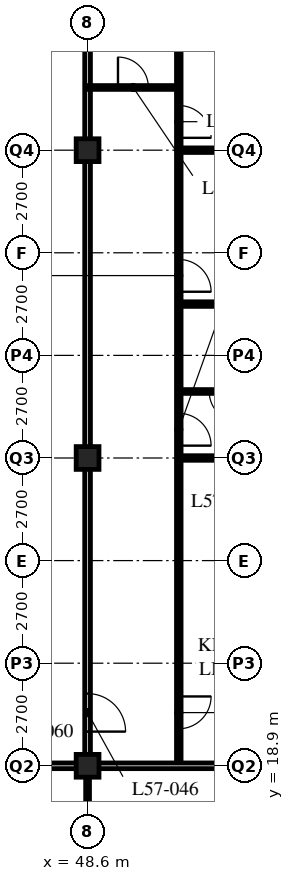
"""IFC4 building model, lengths in metres.
Left out: names, types, materials, properties, quantities, classifications, styles, units other than length and angle.
Written with IfcOpenShell. Run it as: python <this file> out.ifc"""

import sys

from ifc_helpers import new_model, si_unit, direction, frame, frame_2d, origin, origin_2d, place, context, subcontext, project, spatial, rectangle, hollow_rectangle, extrude, element, fill, save


model = new_model("IFC4")
c1 = context("Model", 3, precision=1e-05, world=origin(), true_north=direction((0.0, 1.0)))
c2 = subcontext(c1, "Body", "Model", "MODEL_VIEW")
j1 = project(units=[si_unit("LENGTHUNIT", "METRE"), si_unit("PLANEANGLEUNIT", "RADIAN")], contexts=[c1])
p1 = place(None, origin())
s1 = spatial("IfcSite", under=j1, at=p1, CompositionType="ELEMENT")
p2 = place(p1, origin())
s2 = spatial("IfcBuilding", under=s1, at=p2, CompositionType="ELEMENT")
p3 = place(p2, frame((0.0, 0.0, 220.8)))
s3 = spatial("IfcBuildingStorey", under=s2, at=p3, CompositionType="ELEMENT", Elevation=220.8)
for number, where, z_axis, x_axis in (
    (1, (48.6, 18.9, 0.0), (0.0, 0.0, 1.0), (1.0, 0.0, 0.0)),
    (2, (48.6, 27.0, 0.0), (0.0, 0.0, 1.0), (1.0, 0.0, 0.0)),
    (3, (48.6, 35.1, 0.0), (0.0, 0.0, 1.0), (1.0, 0.0, 0.0)),
):
    element("IfcColumn", number, at=place(p3, frame(where, z_axis=z_axis, x_axis=x_axis)), inside=s3, PredefinedType="COLUMN", context=c2, shape_type="SweptSolid", body=[
        extrude(hollow_rectangle(XDim=0.6, YDim=0.6, WallThickness=0.05, at=origin_2d()), origin(), (0.0, 0.0, 1.0), 3.6),
    ])
p4 = place(p3, frame((12.15, 18.9, 0.0), z_axis=(0.0, 0.0, 1.0), x_axis=(1.0, 0.0, 0.0)))
e4 = element("IfcWall", 4, at=p4, inside=s3, PredefinedType="PARTITIONING", context=c2, shape_type="SweptSolid", body=[
    extrude(rectangle(XDim=36.45, YDim=0.15, at=frame_2d((18.225, 0.0))), origin(), (0.0, 0.0, 1.0), 2.628),
])
p5 = place(p4, frame((4.95, 0.0, 0.0)))
e5 = element("IfcOpeningElement", 5, at=p5, cuts=e4, PredefinedType="OPENING", context=c2, shape_type="SweptSolid", body=[
    extrude(rectangle(XDim=1.0, YDim=2.1, at=frame_2d((0.5, 1.05))), frame((0.0, 0.085, 0.0), z_axis=(0.0, -1.0, 0.0), x_axis=(1.0, 0.0, 0.0)), (0.0, 0.0, 1.0), 0.17),
])
p6 = place(p4, frame((22.6, 0.0, 0.0)))
e6 = element("IfcOpeningElement", 6, at=p6, cuts=e4, PredefinedType="OPENING", context=c2, shape_type="SweptSolid", body=[
    extrude(rectangle(XDim=1.0, YDim=2.1, at=frame_2d((0.5, 1.05))), frame((0.0, 0.085, 0.0), z_axis=(0.0, -1.0, 0.0), x_axis=(1.0, 0.0, 0.0)), (0.0, 0.0, 1.0), 0.17),
])
p7 = place(p4, frame((25.0, 0.0, 0.0)))
e7 = element("IfcOpeningElement", 7, at=p7, cuts=e4, PredefinedType="OPENING", context=c2, shape_type="SweptSolid", body=[
    extrude(rectangle(XDim=1.0, YDim=2.1, at=frame_2d((0.5, 1.05))), frame((0.0, 0.085, 0.0), z_axis=(0.0, -1.0, 0.0), x_axis=(1.0, 0.0, 0.0)), (0.0, 0.0, 1.0), 0.17),
])
p8 = place(p4, frame((30.7, 0.0, 0.0)))
e8 = element("IfcOpeningElement", 8, at=p8, cuts=e4, PredefinedType="OPENING", context=c2, shape_type="SweptSolid", body=[
    extrude(rectangle(XDim=1.0, YDim=2.1, at=frame_2d((0.5, 1.05))), frame((0.0, 0.085, 0.0), z_axis=(0.0, -1.0, 0.0), x_axis=(1.0, 0.0, 0.0)), (0.0, 0.0, 1.0), 0.17),
])
p9 = place(p4, frame((1.525, 0.0, 0.0)))
e9 = element("IfcOpeningElement", 9, at=p9, cuts=e4, PredefinedType="OPENING", context=c2, shape_type="SweptSolid", body=[
    extrude(rectangle(XDim=1.0, YDim=2.1, at=frame_2d((0.5, 1.05))), frame((0.0, 0.085, 0.0), z_axis=(0.0, -1.0, 0.0), x_axis=(1.0, 0.0, 0.0)), (0.0, 0.0, 1.0), 0.17),
])
p10 = place(p4, frame((32.825, 0.0, 0.0)))
e10 = element("IfcOpeningElement", 10, at=p10, cuts=e4, PredefinedType="OPENING", context=c2, shape_type="SweptSolid", body=[
    extrude(rectangle(XDim=1.0, YDim=2.1, at=frame_2d((0.5, 1.05))), frame((0.0, 0.085, 0.0), z_axis=(0.0, -1.0, 0.0), x_axis=(1.0, 0.0, 0.0)), (0.0, 0.0, 1.0), 0.17),
])
p11 = place(p3, frame((48.6, 18.9, 0.0), z_axis=(0.0, 0.0, 1.0), x_axis=(0.0, 1.0, 0.0)))
e11 = element("IfcWall", 11, at=p11, inside=s3, PredefinedType="PARTITIONING", context=c2, shape_type="SweptSolid", body=[
    extrude(rectangle(XDim=24.3, YDim=0.15, at=frame_2d((12.15, 0.0))), origin(), (0.0, 0.0, 1.0), 2.628),
])
p12 = place(p11, frame((0.9, 0.0, 0.0)))
e12 = element("IfcOpeningElement", 12, at=p12, cuts=e11, PredefinedType="OPENING", context=c2, shape_type="SweptSolid", body=[
    extrude(rectangle(XDim=1.0, YDim=2.1, at=frame_2d((0.5, 1.05))), frame((0.0, 0.085, 0.0), z_axis=(0.0, -1.0, 0.0), x_axis=(1.0, 0.0, 0.0)), (0.0, 0.0, 1.0), 0.17),
])
p13 = place(p11, frame((20.95, 0.0, 0.0)))
e13 = element("IfcOpeningElement", 13, at=p13, cuts=e11, PredefinedType="OPENING", context=c2, shape_type="SweptSolid", body=[
    extrude(rectangle(XDim=1.0, YDim=2.1, at=frame_2d((0.5, 1.05))), frame((0.0, 0.085, 0.0), z_axis=(0.0, -1.0, 0.0), x_axis=(1.0, 0.0, 0.0)), (0.0, 0.0, 1.0), 0.17),
])
p14 = place(p3, frame((51.0, 18.9, 0.0), z_axis=(0.0, 0.0, 1.0), x_axis=(0.0, 1.0, 0.0)))
e14 = element("IfcWall", 14, at=p14, inside=s3, PredefinedType="PARTITIONING", context=c2, shape_type="SweptSolid", body=[
    extrude(rectangle(XDim=20.25, YDim=0.12, at=frame_2d((10.125, 0.0))), origin(), (0.0, 0.0, 1.0), 3.39),
])
p15 = place(p14, frame((0.975, 0.0, 0.0)))
e15 = element("IfcOpeningElement", 15, at=p15, cuts=e14, PredefinedType="OPENING", context=c2, shape_type="SweptSolid", body=[
    extrude(rectangle(XDim=0.85, YDim=2.1, at=frame_2d((0.425, 1.05))), frame((0.0, 0.07, 0.0), z_axis=(0.0, -1.0, 0.0), x_axis=(1.0, 0.0, 0.0)), (0.0, 0.0, 1.0), 0.14),
])
p16 = place(p14, frame((8.425, 0.0, 0.0)))
e16 = element("IfcOpeningElement", 16, at=p16, cuts=e14, PredefinedType="OPENING", context=c2, shape_type="SweptSolid", body=[
    extrude(rectangle(XDim=0.85, YDim=2.1, at=frame_2d((0.425, 1.05))), frame((0.0, 0.07, 0.0), z_axis=(0.0, -1.0, 0.0), x_axis=(1.0, 0.0, 0.0)), (0.0, 0.0, 1.0), 0.14),
])
p17 = place(p14, frame((12.475, 0.0, 0.0)))
e17 = element("IfcOpeningElement", 17, at=p17, cuts=e14, PredefinedType="OPENING", context=c2, shape_type="SweptSolid", body=[
    extrude(rectangle(XDim=0.85, YDim=2.1, at=frame_2d((0.425, 1.05))), frame((0.0, 0.07, 0.0), z_axis=(0.0, -1.0, 0.0), x_axis=(1.0, 0.0, 0.0)), (0.0, 0.0, 1.0), 0.14),
])
p18 = place(p14, frame((16.525, 0.0, 0.0)))
e18 = element("IfcOpeningElement", 18, at=p18, cuts=e14, PredefinedType="OPENING", context=c2, shape_type="SweptSolid", body=[
    extrude(rectangle(XDim=0.85, YDim=2.1, at=frame_2d((0.425, 1.05))), frame((0.0, 0.07, 0.0), z_axis=(0.0, -1.0, 0.0), x_axis=(1.0, 0.0, 0.0)), (0.0, 0.0, 1.0), 0.14),
])
p19 = place(p3, frame((48.6, 36.75, 0.0), z_axis=(0.0, 0.0, 1.0), x_axis=(1.0, 0.0, 0.0)))
e19 = element("IfcWall", 19, at=p19, inside=s3, PredefinedType="PARTITIONING", context=c2, shape_type="SweptSolid", body=[
    extrude(rectangle(XDim=2.4, YDim=0.1, at=frame_2d((1.2, 0.0))), origin(), (0.0, 0.0, 1.0), 3.39),
])
p20 = place(p19, frame((0.8, 0.0, 0.0)))
e20 = element("IfcOpeningElement", 20, at=p20, cuts=e19, PredefinedType="OPENING", context=c2, shape_type="SweptSolid", body=[
    extrude(rectangle(XDim=0.8, YDim=2.1, at=frame_2d((0.4, 1.05))), frame((0.0, 0.06, 0.0), z_axis=(0.0, -1.0, 0.0), x_axis=(1.0, 0.0, 0.0)), (0.0, 0.0, 1.0), 0.12),
])
p21 = place(p3, frame((51.0, 28.75, 0.0), z_axis=(0.0, 0.0, 1.0), x_axis=(1.0, 0.0, 0.0)))
e21 = element("IfcWall", 21, at=p21, inside=s3, PredefinedType="PARTITIONING", context=c2, shape_type="SweptSolid", body=[
    extrude(rectangle(XDim=2.4, YDim=0.1, at=frame_2d((1.2, 0.0))), origin(), (0.0, 0.0, 1.0), 3.39),
])
p22 = place(p21, frame((0.8, 0.0, 0.0)))
e22 = element("IfcOpeningElement", 22, at=p22, cuts=e21, PredefinedType="OPENING", context=c2, shape_type="SweptSolid", body=[
    extrude(rectangle(XDim=0.8, YDim=2.1, at=frame_2d((0.4, 1.05))), frame((0.0, 0.06, 0.0), z_axis=(0.0, -1.0, 0.0), x_axis=(1.0, 0.0, 0.0)), (0.0, 0.0, 1.0), 0.12),
])
p23 = place(p3, frame((51.0, 27.0, 0.0), z_axis=(0.0, 0.0, 1.0), x_axis=(1.0, 0.0, 0.0)))
e23 = element("IfcWall", 23, at=p23, inside=s3, PredefinedType="PARTITIONING", context=c2, shape_type="SweptSolid", body=[
    extrude(rectangle(XDim=5.4, YDim=0.12, at=frame_2d((2.7, 0.0))), origin(), (0.0, 0.0, 1.0), 2.628),
])
p24 = place(p3, frame((51.0, 31.05, 0.0), z_axis=(0.0, 0.0, 1.0), x_axis=(1.0, 0.0, 0.0)))
e24 = element("IfcWall", 24, at=p24, inside=s3, PredefinedType="PARTITIONING", context=c2, shape_type="SweptSolid", body=[
    extrude(rectangle(XDim=5.4, YDim=0.12, at=frame_2d((2.7, 0.0))), origin(), (0.0, 0.0, 1.0), 3.39),
])
p25 = place(p3, frame((51.0, 35.1, 0.0), z_axis=(0.0, 0.0, 1.0), x_axis=(1.0, 0.0, 0.0)))
e25 = element("IfcWall", 25, at=p25, inside=s3, PredefinedType="PARTITIONING", context=c2, shape_type="SweptSolid", body=[
    extrude(rectangle(XDim=5.4, YDim=0.12, at=frame_2d((2.7, 0.0))), origin(), (0.0, 0.0, 1.0), 2.628),
])
p26 = place(p3, frame((48.6, 18.9, 0.0), z_axis=(0.0, 0.0, 1.0), x_axis=(0.0, -1.0, 0.0)))
e26 = element("IfcWall", 26, at=p26, inside=s3, PredefinedType="PARTITIONING", context=c2, shape_type="SweptSolid", body=[
    extrude(rectangle(XDim=2.4, YDim=0.1, at=frame_2d((1.2, 0.0))), origin(), (0.0, 0.0, 1.0), 2.628),
])
p27 = place(p3, frame((48.6, 18.9, 0.0), z_axis=(0.0, 0.0, 1.0), x_axis=(1.0, 0.0, 0.0)))
e27 = element("IfcWall", 27, at=p27, inside=s3, PredefinedType="PARTITIONING", context=c2, shape_type="SweptSolid", body=[
    extrude(rectangle(XDim=3.75, YDim=0.15, at=frame_2d((1.875, 0.0))), origin(), (0.0, 0.0, 1.0), 2.628),
])
p28 = place(p20, origin())
e28 = element("IfcDoor", 28, at=p28, inside=s3, OperationType="SINGLE_SWING_LEFT", PredefinedType="DOOR", context=c2, shape_type="SweptSolid", body=[
    extrude(rectangle(XDim=0.8, YDim=2.1, at=frame_2d((0.4, 1.05))), frame((0.0, 0.025, 0.0), z_axis=(0.0, -1.0, 0.0), x_axis=(1.0, 0.0, 0.0)), (0.0, 0.0, 1.0), 0.05),
])
fill(e20, e28)
p29 = place(p12, origin())
e29 = element("IfcDoor", 29, at=p29, inside=s3, OperationType="SINGLE_SWING_RIGHT", PredefinedType="DOOR", context=c2, shape_type="SweptSolid", body=[
    extrude(rectangle(XDim=1.0, YDim=2.1, at=frame_2d((0.5, 1.05))), frame((0.0, 0.025, 0.0), z_axis=(0.0, -1.0, 0.0), x_axis=(1.0, 0.0, 0.0)), (0.0, 0.0, 1.0), 0.05),
])
fill(e12, e29)
p30 = place(p15, origin())
e30 = element("IfcDoor", 30, at=p30, inside=s3, OperationType="SINGLE_SWING_LEFT", PredefinedType="DOOR", context=c2, shape_type="SweptSolid", body=[
    extrude(rectangle(XDim=0.85, YDim=2.1, at=frame_2d((0.425, 1.05))), frame((0.0, 0.025, 0.0), z_axis=(0.0, -1.0, 0.0), x_axis=(1.0, 0.0, 0.0)), (0.0, 0.0, 1.0), 0.05),
])
fill(e15, e30)
p31 = place(p22, origin())
e31 = element("IfcDoor", 31, at=p31, inside=s3, OperationType="SINGLE_SWING_LEFT", PredefinedType="DOOR", context=c2, shape_type="SweptSolid", body=[
    extrude(rectangle(XDim=0.8, YDim=2.1, at=frame_2d((0.4, 1.05))), frame((0.0, 0.025, 0.0), z_axis=(0.0, -1.0, 0.0), x_axis=(1.0, 0.0, 0.0)), (0.0, 0.0, 1.0), 0.05),
])
fill(e22, e31)
p32 = place(p16, origin())
e32 = element("IfcDoor", 32, at=p32, inside=s3, OperationType="SINGLE_SWING_RIGHT", PredefinedType="DOOR", context=c2, shape_type="SweptSolid", body=[
    extrude(rectangle(XDim=0.85, YDim=2.1, at=frame_2d((0.425, 1.05))), frame((0.0, 0.025, 0.0), z_axis=(0.0, -1.0, 0.0), x_axis=(1.0, 0.0, 0.0)), (0.0, 0.0, 1.0), 0.05),
])
fill(e16, e32)
p33 = place(p17, origin())
e33 = element("IfcDoor", 33, at=p33, inside=s3, OperationType="SINGLE_SWING_RIGHT", PredefinedType="DOOR", context=c2, shape_type="SweptSolid", body=[
    extrude(rectangle(XDim=0.85, YDim=2.1, at=frame_2d((0.425, 1.05))), frame((0.0, 0.025, 0.0), z_axis=(0.0, -1.0, 0.0), x_axis=(1.0, 0.0, 0.0)), (0.0, 0.0, 1.0), 0.05),
])
fill(e17, e33)
p34 = place(p18, origin())
e34 = element("IfcDoor", 34, at=p34, inside=s3, OperationType="SINGLE_SWING_RIGHT", PredefinedType="DOOR", context=c2, shape_type="SweptSolid", body=[
    extrude(rectangle(XDim=0.85, YDim=2.1, at=frame_2d((0.425, 1.05))), frame((0.0, 0.025, 0.0), z_axis=(0.0, -1.0, 0.0), x_axis=(1.0, 0.0, 0.0)), (0.0, 0.0, 1.0), 0.05),
])
fill(e18, e34)
save(model, sys.argv[1])
